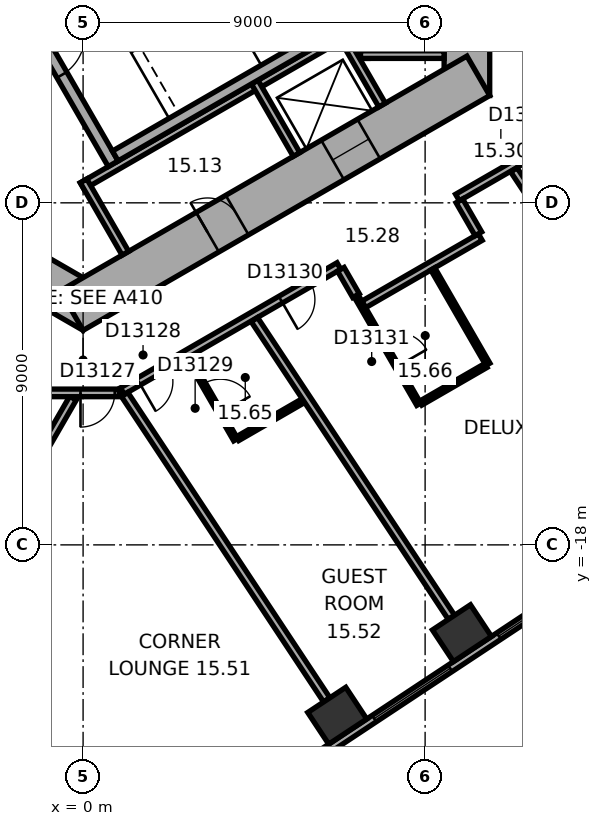
"""IFC4 building model, lengths in metres.
Left out: names, types, materials, properties, quantities, classifications, styles, units other than length and angle.
Written with IfcOpenShell. Run it as: python <this file> out.ifc"""

import sys

from ifc_helpers import new_model, si_unit, direction, frame, frame_2d, origin, origin_2d, place, context, subcontext, project, spatial, rectangle, extrude, element, fill, save


model = new_model("IFC4")
c1 = context("Model", 3, precision=1e-05, world=origin(), true_north=direction((0.0, 1.0)))
c2 = subcontext(c1, "Body", "Model", "MODEL_VIEW")
j1 = project(units=[si_unit("LENGTHUNIT", "METRE"), si_unit("PLANEANGLEUNIT", "RADIAN")], contexts=[c1])
p1 = place(None, origin())
s1 = spatial("IfcSite", under=j1, at=p1, CompositionType="ELEMENT")
p2 = place(p1, origin())
s2 = spatial("IfcBuilding", under=s1, at=p2, CompositionType="ELEMENT")
p3 = place(p2, frame((0.0, 0.0, 70.4)))
s3 = spatial("IfcBuildingStorey", under=s2, at=p3, CompositionType="ELEMENT", Elevation=70.4)
for number, where, z_axis, x_axis in (
    (1, (6.688, -22.496, 0.0), (0.0, 0.0, 1.0), (0.834, 0.552, 0.0)),
    (2, (9.969, -20.324, 0.0), (0.0, 0.0, 1.0), (0.834, 0.552, 0.0)),
):
    element("IfcColumn", number, at=place(p3, frame(where, z_axis=z_axis, x_axis=x_axis)), inside=s3, PredefinedType="COLUMN", context=c2, shape_type="SweptSolid", body=[
        extrude(rectangle(XDim=1.2, YDim=1.0, at=origin_2d()), origin(), (0.0, 0.0, 1.0), 3.3),
    ])
p4 = place(p3, frame((10.1, -6.177, 0.0), z_axis=(0.0, 0.0, 1.0), x_axis=(0.0, 1.0, 0.0)))
e3 = element("IfcWall", 3, at=p4, inside=s3, PredefinedType="SHEAR", context=c2, shape_type="SweptSolid", body=[
    extrude(rectangle(XDim=12.355, YDim=1.2, at=frame_2d((6.177, 0.0))), origin(), (0.0, 0.0, 1.0), 3.3),
])
p5 = place(p4, frame((6.378, 0.0, 0.0)))
e4 = element("IfcOpeningElement", 4, at=p5, cuts=e3, PredefinedType="OPENING", context=c2, shape_type="SweptSolid", body=[
    extrude(rectangle(XDim=1.5, YDim=2.1, at=frame_2d((0.75, 1.05))), frame((0.0, 0.61, 0.0), z_axis=(0.0, -1.0, 0.0), x_axis=(1.0, 0.0, 0.0)), (0.0, 0.0, 1.0), 1.22),
])
p6 = place(p4, frame((1.828, 0.0, 0.0)))
e5 = element("IfcOpeningElement", 5, at=p6, cuts=e3, PredefinedType="OPENING", context=c2, shape_type="SweptSolid", body=[
    extrude(rectangle(XDim=1.1, YDim=2.1, at=frame_2d((0.55, 1.05))), frame((0.0, 0.61, 0.0), z_axis=(0.0, -1.0, 0.0), x_axis=(1.0, 0.0, 0.0)), (0.0, 0.0, 1.0), 1.22),
])
p7 = place(p4, frame((4.427, 0.0, 0.0)))
e6 = element("IfcOpeningElement", 6, at=p7, cuts=e3, PredefinedType="OPENING", context=c2, shape_type="SweptSolid", body=[
    extrude(rectangle(XDim=1.1, YDim=2.1, at=frame_2d((0.55, 1.05))), frame((0.0, 0.61, 0.0), z_axis=(0.0, -1.0, 0.0), x_axis=(1.0, 0.0, 0.0)), (0.0, 0.0, 1.0), 1.22),
])
p8 = place(p3, frame((-10.4, -5.658, 0.0), z_axis=(0.0, 0.0, 1.0), x_axis=(0.866021384402, -0.500006961711, 0.0)))
e7 = element("IfcWall", 7, at=p8, inside=s3, PredefinedType="SHEAR", context=c2, shape_type="SweptSolid", body=[
    extrude(rectangle(XDim=12.355, YDim=1.2, at=frame_2d((6.178, 0.0))), origin(), (0.0, 0.0, 1.0), 3.3),
])
p9 = place(p8, frame((6.378, 0.0, 0.0)))
e8 = element("IfcOpeningElement", 8, at=p9, cuts=e7, PredefinedType="OPENING", context=c2, shape_type="SweptSolid", body=[
    extrude(rectangle(XDim=1.5, YDim=2.1, at=frame_2d((0.75, 1.05))), frame((0.0, 0.61, 0.0), z_axis=(0.0, -1.0, 0.0), x_axis=(1.0, 0.0, 0.0)), (0.0, 0.0, 1.0), 1.22),
])
p10 = place(p8, frame((3.228, 0.0, 0.0)))
e9 = element("IfcOpeningElement", 9, at=p10, cuts=e7, PredefinedType="OPENING", context=c2, shape_type="SweptSolid", body=[
    extrude(rectangle(XDim=0.9, YDim=2.1, at=frame_2d((0.45, 1.05))), frame((0.0, 0.61, 0.0), z_axis=(0.0, -1.0, 0.0), x_axis=(1.0, 0.0, 0.0)), (0.0, 0.0, 1.0), 1.22),
])
p11 = place(p3, frame((-0.3, -11.836, 0.0), z_axis=(0.0, 0.0, 1.0), x_axis=(0.866021384402, 0.500006961711, 0.0)))
e10 = element("IfcWall", 10, at=p11, inside=s3, PredefinedType="SHEAR", context=c2, shape_type="SweptSolid", body=[
    extrude(rectangle(XDim=12.355, YDim=1.2, at=frame_2d((6.178, 0.0))), origin(), (0.0, 0.0, 1.0), 3.3),
])
p12 = place(p11, frame((4.128, 0.0, 0.0)))
e11 = element("IfcOpeningElement", 11, at=p12, cuts=e10, PredefinedType="OPENING", context=c2, shape_type="SweptSolid", body=[
    extrude(rectangle(XDim=0.9, YDim=2.1, at=frame_2d((0.45, 1.05))), frame((0.0, 0.61, 0.0), z_axis=(0.0, -1.0, 0.0), x_axis=(1.0, 0.0, 0.0)), (0.0, 0.0, 1.0), 1.22),
])
p13 = place(p11, frame((7.928, 0.0, 0.0)))
e12 = element("IfcOpeningElement", 12, at=p13, cuts=e10, PredefinedType="OPENING", context=c2, shape_type="SweptSolid", body=[
    extrude(rectangle(XDim=1.1, YDim=2.1, at=frame_2d((0.55, 1.05))), frame((0.0, 0.61, 0.0), z_axis=(0.0, -1.0, 0.0), x_axis=(1.0, 0.0, 0.0)), (0.0, 0.0, 1.0), 1.22),
])
p14 = place(p3, frame((3.083, -25.601, 0.0), z_axis=(0.0, 0.0, 1.0), x_axis=(0.833884295743, 0.551939291329, 0.0)))
e13 = element("IfcWall", 13, at=p14, inside=s3, PredefinedType="STANDARD", context=c2, shape_type="SweptSolid", body=[
    extrude(rectangle(XDim=21.246, YDim=0.2, at=frame_2d((10.623, 0.0))), origin(), (0.0, 0.0, 1.0), 3.3),
])
p15 = place(p14, frame((1.553, 0.0, 0.8)))
e14 = element("IfcOpeningElement", 14, at=p15, cuts=e13, PredefinedType="OPENING", context=c2, shape_type="SweptSolid", body=[
    extrude(rectangle(XDim=2.4, YDim=1.7, at=frame_2d((1.2, 0.85))), frame((0.0, 0.11, 0.0), z_axis=(0.0, -1.0, 0.0), x_axis=(1.0, 0.0, 0.0)), (0.0, 0.0, 1.0), 0.22),
])
p16 = place(p14, frame((5.488, 0.0, 0.8)))
e15 = element("IfcOpeningElement", 15, at=p16, cuts=e13, PredefinedType="OPENING", context=c2, shape_type="SweptSolid", body=[
    extrude(rectangle(XDim=2.4, YDim=1.7, at=frame_2d((1.2, 0.85))), frame((0.0, 0.11, 0.0), z_axis=(0.0, -1.0, 0.0), x_axis=(1.0, 0.0, 0.0)), (0.0, 0.0, 1.0), 0.22),
])
p17 = place(p14, frame((9.422, 0.0, 0.8)))
e16 = element("IfcOpeningElement", 16, at=p17, cuts=e13, PredefinedType="OPENING", context=c2, shape_type="SweptSolid", body=[
    extrude(rectangle(XDim=2.4, YDim=1.7, at=frame_2d((1.2, 0.85))), frame((0.0, 0.11, 0.0), z_axis=(0.0, -1.0, 0.0), x_axis=(1.0, 0.0, 0.0)), (0.0, 0.0, 1.0), 0.22),
])
p18 = place(p14, frame((13.357, 0.0, 0.8)))
e17 = element("IfcOpeningElement", 17, at=p18, cuts=e13, PredefinedType="OPENING", context=c2, shape_type="SweptSolid", body=[
    extrude(rectangle(XDim=2.4, YDim=1.7, at=frame_2d((1.2, 0.85))), frame((0.0, 0.11, 0.0), z_axis=(0.0, -1.0, 0.0), x_axis=(1.0, 0.0, 0.0)), (0.0, 0.0, 1.0), 0.22),
])
p19 = place(p14, frame((17.291, 0.0, 0.8)))
e18 = element("IfcOpeningElement", 18, at=p19, cuts=e13, PredefinedType="OPENING", context=c2, shape_type="SweptSolid", body=[
    extrude(rectangle(XDim=2.4, YDim=1.7, at=frame_2d((1.2, 0.85))), frame((0.0, 0.11, 0.0), z_axis=(0.0, -1.0, 0.0), x_axis=(1.0, 0.0, 0.0)), (0.0, 0.0, 1.0), 0.22),
])
p20 = place(p3, frame((7.4, -5.2, 0.0), z_axis=(0.0, 0.0, 1.0), x_axis=(0.0, 1.0, 0.0)))
e19 = element("IfcWall", 19, at=p20, inside=s3, PredefinedType="PARTITIONING", context=c2, shape_type="SweptSolid", body=[
    extrude(rectangle(XDim=5.4, YDim=0.2, at=frame_2d((2.7, 0.0))), origin(), (0.0, 0.0, 1.0), 3.05),
])
p21 = place(p3, frame((7.3, -5.1, 0.0), z_axis=(0.0, 0.0, 1.0), x_axis=(1.0, 0.0, 0.0)))
e20 = element("IfcWall", 20, at=p21, inside=s3, PredefinedType="PARTITIONING", context=c2, shape_type="SweptSolid", body=[
    extrude(rectangle(XDim=2.2, YDim=0.2, at=frame_2d((1.1, 0.0))), origin(), (0.0, 0.0, 1.0), 3.05),
])
p22 = place(p3, frame((-0.024, -8.559, 0.0), z_axis=(0.0, 0.0, 1.0), x_axis=(0.866026010844, 0.49999894854, 0.0)))
e21 = element("IfcWall", 21, at=p22, inside=s3, PredefinedType="PARTITIONING", context=c2, shape_type="SweptSolid", body=[
    extrude(rectangle(XDim=8.0, YDim=0.2, at=frame_2d((4.0, 0.0))), origin(), (0.0, 0.0, 1.0), 3.05),
])
for number, where, z_axis, x_axis in (
    (22, (0.013, -8.422, 0.0), (0.0, 0.0, 1.0), (0.5, -0.866, 0.0)),
    (23, (4.516, -5.822, 0.0), (0.0, 0.0, 1.0), (0.5, -0.866, 0.0)),
    (24, (6.768, -4.522, 0.0), (0.0, 0.0, 1.0), (0.5, -0.866, 0.0)),
):
    element("IfcWall", number, at=place(p3, frame(where, z_axis=z_axis, x_axis=x_axis)), inside=s3, PredefinedType="PARTITIONING", context=c2, shape_type="SweptSolid", body=[
        extrude(rectangle(XDim=2.2, YDim=0.2, at=frame_2d((1.1, 0.0))), origin(), (0.0, 0.0, 1.0), 3.05),
    ])
p23 = place(p3, frame((-1.558, -3.902, 0.0), z_axis=(0.0, 0.0, 1.0), x_axis=(0.499977259774, -0.866038532462, 0.0)))
e25 = element("IfcWall", 25, at=p23, inside=s3, PredefinedType="SHEAR", context=c2, shape_type="SweptSolid", body=[
    extrude(rectangle(XDim=4.7, YDim=0.3, at=frame_2d((2.35, 0.0))), origin(), (0.0, 0.0, 1.0), 3.05),
])
p24 = place(p23, frame((0.8, 0.0, 0.0)))
e26 = element("IfcOpeningElement", 26, at=p24, cuts=e25, PredefinedType="OPENING", context=c2, shape_type="SweptSolid", body=[
    extrude(rectangle(XDim=1.2, YDim=2.1, at=frame_2d((0.6, 1.05))), frame((0.0, 0.16, 0.0), z_axis=(0.0, -1.0, 0.0), x_axis=(1.0, 0.0, 0.0)), (0.0, 0.0, 1.0), 0.32),
])
p25 = place(p3, frame((0.847, -7.767, 0.0), z_axis=(0.0, 0.0, 1.0), x_axis=(0.866027801685, 0.499995846692, 0.0)))
e27 = element("IfcWall", 27, at=p25, inside=s3, PredefinedType="SHEAR", context=c2, shape_type="SweptSolid", body=[
    extrude(rectangle(XDim=7.06, YDim=0.3, at=frame_2d((3.53, 0.0))), origin(), (0.0, 0.0, 1.0), 3.05),
])
p26 = place(p3, frame((-5.052, -22.429, 0.0), z_axis=(0.0, 0.0, 1.0), x_axis=(0.500004329283, 0.866022904257, 0.0)))
e28 = element("IfcWall", 28, at=p26, inside=s3, PredefinedType="PARTITIONING", context=c2, shape_type="SweptSolid", body=[
    extrude(rectangle(XDim=9.572, YDim=0.2, at=frame_2d((4.786, 0.0))), origin(), (0.0, 0.0, 1.0), 3.05),
])
p27 = place(p3, frame((-0.91, -14.001, 0.0), z_axis=(0.0, 0.0, 1.0), x_axis=(1.0, 0.0, 0.0)))
e29 = element("IfcWall", 29, at=p27, inside=s3, PredefinedType="PARTITIONING", context=c2, shape_type="SweptSolid", body=[
    extrude(rectangle(XDim=1.86, YDim=0.2, at=frame_2d((0.93, 0.0))), origin(), (0.0, 0.0, 1.0), 3.05),
])
p28 = place(p27, frame((0.842, 0.0, 0.0)))
e30 = element("IfcOpeningElement", 30, at=p28, cuts=e29, PredefinedType="OPENING", context=c2, shape_type="SweptSolid", body=[
    extrude(rectangle(XDim=0.9, YDim=2.1, at=frame_2d((0.45, 1.05))), frame((0.0, 0.11, 0.0), z_axis=(0.0, -1.0, 0.0), x_axis=(1.0, 0.0, 0.0)), (0.0, 0.0, 1.0), 0.22),
])
p29 = place(p3, frame((1.033, -13.953, 0.0), z_axis=(0.0, 0.0, 1.0), x_axis=(0.866017531406, 0.500013635111, 0.0)))
e31 = element("IfcWall", 31, at=p29, inside=s3, PredefinedType="PARTITIONING", context=c2, shape_type="SweptSolid", body=[
    extrude(rectangle(XDim=6.58, YDim=0.2, at=frame_2d((3.29, 0.0))), origin(), (0.0, 0.0, 1.0), 3.05),
])
p30 = place(p29, frame((0.496, 0.0, 0.0)))
e32 = element("IfcOpeningElement", 32, at=p30, cuts=e31, PredefinedType="OPENING", context=c2, shape_type="SweptSolid", body=[
    extrude(rectangle(XDim=0.9, YDim=2.1, at=frame_2d((0.45, 1.05))), frame((0.0, 0.11, 0.0), z_axis=(0.0, -1.0, 0.0), x_axis=(1.0, 0.0, 0.0)), (0.0, 0.0, 1.0), 0.22),
])
p31 = place(p29, frame((4.811, 0.0, 0.0)))
e33 = element("IfcOpeningElement", 33, at=p31, cuts=e31, PredefinedType="OPENING", context=c2, shape_type="SweptSolid", body=[
    extrude(rectangle(XDim=0.9, YDim=2.1, at=frame_2d((0.45, 1.05))), frame((0.0, 0.11, 0.0), z_axis=(0.0, -1.0, 0.0), x_axis=(1.0, 0.0, 0.0)), (0.0, 0.0, 1.0), 0.22),
])
p32 = place(p3, frame((4.015, -15.233, 0.0), z_axis=(0.0, 0.0, 1.0), x_axis=(-0.499961950354, 0.866047370643, 0.0)))
e34 = element("IfcWall", 34, at=p32, inside=s3, PredefinedType="PARTITIONING", context=c2, shape_type="SweptSolid", body=[
    extrude(rectangle(XDim=2.5, YDim=0.12, at=frame_2d((1.25, 0.0))), origin(), (0.0, 0.0, 1.0), 3.05),
])
p33 = place(p32, frame((0.8, 0.0, 0.0)))
e35 = element("IfcOpeningElement", 35, at=p33, cuts=e34, PredefinedType="OPENING", context=c2, shape_type="SweptSolid", body=[
    extrude(rectangle(XDim=0.9, YDim=2.1, at=frame_2d((0.45, 1.05))), frame((0.0, 0.07, 0.0), z_axis=(0.0, -1.0, 0.0), x_axis=(1.0, 0.0, 0.0)), (0.0, 0.0, 1.0), 0.14),
])
p34 = place(p3, frame((5.798, -14.204, 0.0), z_axis=(0.0, 0.0, 1.0), x_axis=(-0.865972029493, -0.500092435591, 0.0)))
e36 = element("IfcWall", 36, at=p34, inside=s3, PredefinedType="PARTITIONING", context=c2, shape_type="SweptSolid", body=[
    extrude(rectangle(XDim=1.999, YDim=0.12, at=frame_2d((1.0, 0.0))), origin(), (0.0, 0.0, 1.0), 3.05),
])
p35 = place(p3, frame((6.412, -22.079, 0.0), z_axis=(0.0, 0.0, 1.0), x_axis=(-0.551919507115, 0.83389739037, 0.0)))
e37 = element("IfcWall", 37, at=p35, inside=s3, PredefinedType="PARTITIONING", context=c2, shape_type="SweptSolid", body=[
    extrude(rectangle(XDim=9.635, YDim=0.2, at=frame_2d((4.817, 0.0))), origin(), (0.0, 0.0, 1.0), 3.05),
])
p36 = place(p3, frame((6.782, -10.749, 0.0), z_axis=(0.0, 0.0, 1.0), x_axis=(0.500170954823, -0.865926680471, 0.0)))
e38 = element("IfcWall", 38, at=p36, inside=s3, PredefinedType="PARTITIONING", context=c2, shape_type="SweptSolid", body=[
    extrude(rectangle(XDim=0.801, YDim=0.2, at=frame_2d((0.4, 0.0))), origin(), (0.0, 0.0, 1.0), 3.05),
])
p37 = place(p3, frame((7.385, -11.673, 0.0), z_axis=(0.0, 0.0, 1.0), x_axis=(0.866037524642, 0.499979005472, 0.0)))
e39 = element("IfcWall", 39, at=p37, inside=s3, PredefinedType="PARTITIONING", context=c2, shape_type="SweptSolid", body=[
    extrude(rectangle(XDim=3.542, YDim=0.2, at=frame_2d((1.771, 0.0))), origin(), (0.0, 0.0, 1.0), 3.05),
])
p38 = place(p3, frame((8.833, -14.301, 0.0), z_axis=(0.0, 0.0, 1.0), x_axis=(-0.499936836718, 0.866061868051, 0.0)))
e40 = element("IfcWall", 40, at=p38, inside=s3, PredefinedType="PARTITIONING", context=c2, shape_type="SweptSolid", body=[
    extrude(rectangle(XDim=3.188, YDim=0.12, at=frame_2d((1.594, 0.0))), origin(), (0.0, 0.0, 1.0), 3.05),
])
p39 = place(p38, frame((1.144, 0.0, 0.0)))
e41 = element("IfcOpeningElement", 41, at=p39, cuts=e40, PredefinedType="OPENING", context=c2, shape_type="SweptSolid", body=[
    extrude(rectangle(XDim=0.9, YDim=2.1, at=frame_2d((0.45, 1.05))), frame((0.0, 0.07, 0.0), z_axis=(0.0, -1.0, 0.0), x_axis=(1.0, 0.0, 0.0)), (0.0, 0.0, 1.0), 0.14),
])
p40 = place(p3, frame((9.203, -10.738, 0.0), z_axis=(0.0, 0.0, 1.0), x_axis=(0.50005036918, -0.865996321171, 0.0)))
e42 = element("IfcWall", 42, at=p40, inside=s3, PredefinedType="PARTITIONING", context=c2, shape_type="SweptSolid", body=[
    extrude(rectangle(XDim=2.9, YDim=0.12, at=frame_2d((1.45, 0.0))), origin(), (0.0, 0.0, 1.0), 3.05),
])
p41 = place(p3, frame((9.693, -19.907, 0.0), z_axis=(0.0, 0.0, 1.0), x_axis=(-0.551938394837, 0.833884889121, 0.0)))
e43 = element("IfcWall", 43, at=p41, inside=s3, PredefinedType="PARTITIONING", context=c2, shape_type="SweptSolid", body=[
    extrude(rectangle(XDim=9.394, YDim=0.2, at=frame_2d((4.697, 0.0))), origin(), (0.0, 0.0, 1.0), 2.6),
])
p42 = place(p3, frame((9.852, -8.861, 0.0), z_axis=(0.0, 0.0, 1.0), x_axis=(0.866013291437, 0.500020978615, 0.0)))
e44 = element("IfcWall", 44, at=p42, inside=s3, PredefinedType="PARTITIONING", context=c2, shape_type="SweptSolid", body=[
    extrude(rectangle(XDim=2.077, YDim=0.2, at=frame_2d((1.038, 0.0))), origin(), (0.0, 0.0, 1.0), 3.05),
])
p43 = place(p3, frame((10.402, -9.815, 0.0), z_axis=(0.0, 0.0, 1.0), x_axis=(-0.499968756647, 0.866043441391, 0.0)))
e45 = element("IfcWall", 45, at=p43, inside=s3, PredefinedType="PARTITIONING", context=c2, shape_type="SweptSolid", body=[
    extrude(rectangle(XDim=1.001, YDim=0.2, at=frame_2d((0.5, 0.0))), origin(), (0.0, 0.0, 1.0), 3.05),
])
p44 = place(p3, frame((10.601, -13.28, 0.0), z_axis=(0.0, 0.0, 1.0), x_axis=(-0.866044057189, -0.499967689963, 0.0)))
e46 = element("IfcWall", 46, at=p44, inside=s3, PredefinedType="PARTITIONING", context=c2, shape_type="SweptSolid", body=[
    extrude(rectangle(XDim=1.982, YDim=0.12, at=frame_2d((0.991, 0.0))), origin(), (0.0, 0.0, 1.0), 3.05),
])
p45 = place(p3, frame((16.255, -15.564, 0.0), z_axis=(0.0, 0.0, 1.0), x_axis=(-0.55192208744, 0.833895682562, 0.0)))
e47 = element("IfcWall", 47, at=p45, inside=s3, PredefinedType="PARTITIONING", context=c2, shape_type="SweptSolid", body=[
    extrude(rectangle(XDim=8.913, YDim=0.2, at=frame_2d((4.457, 0.0))), origin(), (0.0, 0.0, 1.0), 2.6),
])
p46 = place(p16, origin())
e48 = element("IfcWindow", 48, at=p46, inside=s3, PartitioningType="SINGLE_PANEL", PredefinedType="WINDOW", context=c2, shape_type="SweptSolid", body=[
    extrude(rectangle(XDim=2.4, YDim=1.7, at=frame_2d((1.2, 0.85))), frame((0.0, 0.03, 0.0), z_axis=(0.0, -1.0, 0.0), x_axis=(1.0, 0.0, 0.0)), (0.0, 0.0, 1.0), 0.06),
])
fill(e15, e48)
p47 = place(p17, origin())
e49 = element("IfcWindow", 49, at=p47, inside=s3, PartitioningType="SINGLE_PANEL", PredefinedType="WINDOW", context=c2, shape_type="SweptSolid", body=[
    extrude(rectangle(XDim=2.4, YDim=1.7, at=frame_2d((1.2, 0.85))), frame((0.0, 0.03, 0.0), z_axis=(0.0, -1.0, 0.0), x_axis=(1.0, 0.0, 0.0)), (0.0, 0.0, 1.0), 0.06),
])
fill(e16, e49)
p48 = place(p24, origin())
e50 = element("IfcDoor", 50, at=p48, inside=s3, OperationType="SINGLE_SWING_RIGHT", PredefinedType="DOOR", context=c2, shape_type="SweptSolid", body=[
    extrude(rectangle(XDim=1.2, YDim=2.1, at=frame_2d((0.6, 1.05))), frame((0.0, 0.025, 0.0), z_axis=(0.0, -1.0, 0.0), x_axis=(1.0, 0.0, 0.0)), (0.0, 0.0, 1.0), 0.05),
])
fill(e26, e50)
p49 = place(p12, origin())
e51 = element("IfcDoor", 51, at=p49, inside=s3, OperationType="SINGLE_SWING_LEFT", PredefinedType="DOOR", context=c2, shape_type="SweptSolid", body=[
    extrude(rectangle(XDim=0.9, YDim=2.1, at=frame_2d((0.45, 1.05))), frame((0.0, 0.025, 0.0), z_axis=(0.0, -1.0, 0.0), x_axis=(1.0, 0.0, 0.0)), (0.0, 0.0, 1.0), 0.05),
])
fill(e11, e51)
p50 = place(p13, origin())
e52 = element("IfcDoor", 52, at=p50, inside=s3, OperationType="DOUBLE_DOOR_SLIDING", PredefinedType="DOOR", context=c2, shape_type="SweptSolid", body=[
    extrude(rectangle(XDim=1.1, YDim=2.1, at=frame_2d((0.55, 1.05))), frame((0.0, 0.025, 0.0), z_axis=(0.0, -1.0, 0.0), x_axis=(1.0, 0.0, 0.0)), (0.0, 0.0, 1.0), 0.05),
])
fill(e12, e52)
p51 = place(p28, origin())
e53 = element("IfcDoor", 53, at=p51, inside=s3, OperationType="SINGLE_SWING_LEFT", PredefinedType="DOOR", context=c2, shape_type="SweptSolid", body=[
    extrude(rectangle(XDim=0.9, YDim=2.1, at=frame_2d((0.45, 1.05))), frame((0.0, 0.025, 0.0), z_axis=(0.0, -1.0, 0.0), x_axis=(1.0, 0.0, 0.0)), (0.0, 0.0, 1.0), 0.05),
])
fill(e30, e53)
p52 = place(p30, origin())
e54 = element("IfcDoor", 54, at=p52, inside=s3, OperationType="SINGLE_SWING_LEFT", PredefinedType="DOOR", context=c2, shape_type="SweptSolid", body=[
    extrude(rectangle(XDim=0.9, YDim=2.1, at=frame_2d((0.45, 1.05))), frame((0.0, 0.025, 0.0), z_axis=(0.0, -1.0, 0.0), x_axis=(1.0, 0.0, 0.0)), (0.0, 0.0, 1.0), 0.05),
])
fill(e32, e54)
p53 = place(p33, origin())
e55 = element("IfcDoor", 55, at=p53, inside=s3, OperationType="SINGLE_SWING_LEFT", PredefinedType="DOOR", context=c2, shape_type="SweptSolid", body=[
    extrude(rectangle(XDim=0.9, YDim=2.1, at=frame_2d((0.45, 1.05))), frame((0.0, 0.025, 0.0), z_axis=(0.0, -1.0, 0.0), x_axis=(1.0, 0.0, 0.0)), (0.0, 0.0, 1.0), 0.05),
])
fill(e35, e55)
p54 = place(p31, origin())
e56 = element("IfcDoor", 56, at=p54, inside=s3, OperationType="SINGLE_SWING_LEFT", PredefinedType="DOOR", context=c2, shape_type="SweptSolid", body=[
    extrude(rectangle(XDim=0.9, YDim=2.1, at=frame_2d((0.45, 1.05))), frame((0.0, 0.025, 0.0), z_axis=(0.0, -1.0, 0.0), x_axis=(1.0, 0.0, 0.0)), (0.0, 0.0, 1.0), 0.05),
])
fill(e33, e56)
p55 = place(p39, origin())
e57 = element("IfcDoor", 57, at=p55, inside=s3, OperationType="SINGLE_SWING_LEFT", PredefinedType="DOOR", context=c2, shape_type="SweptSolid", body=[
    extrude(rectangle(XDim=0.9, YDim=2.1, at=frame_2d((0.45, 1.05))), frame((0.0, 0.025, 0.0), z_axis=(0.0, -1.0, 0.0), x_axis=(1.0, 0.0, 0.0)), (0.0, 0.0, 1.0), 0.05),
])
fill(e41, e57)
save(model, sys.argv[1])
